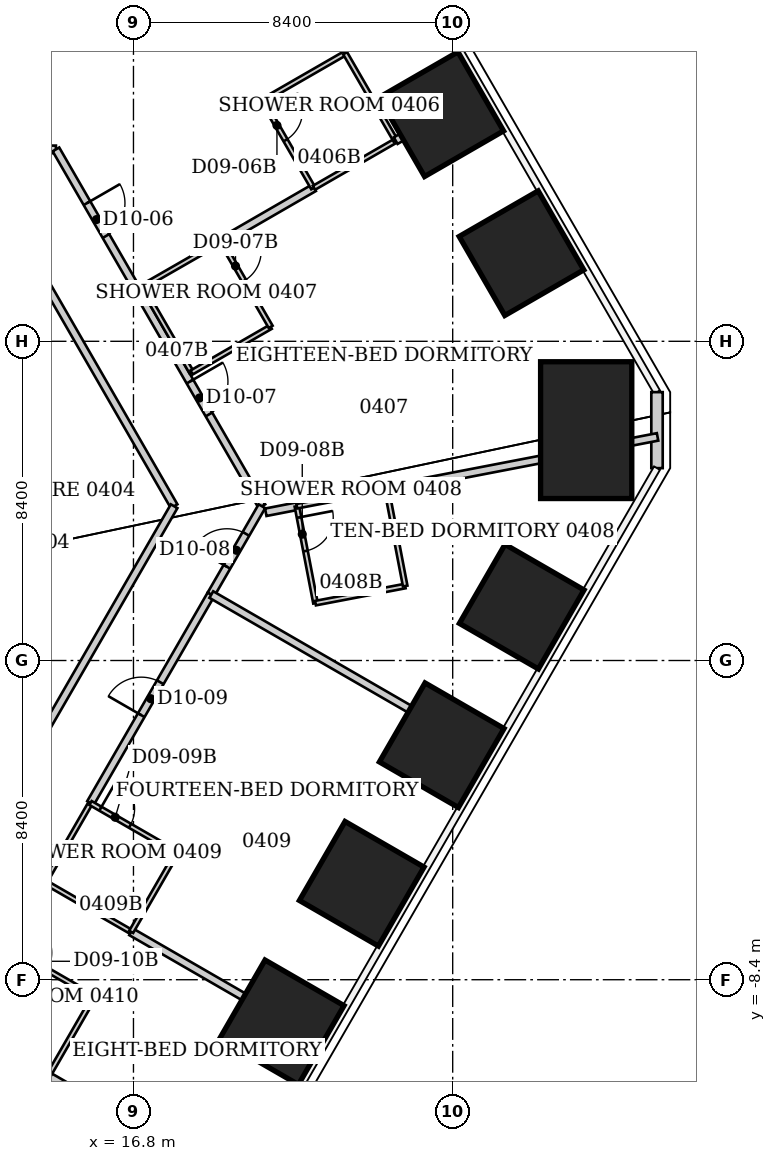
"""IFC4 building model, lengths in metres.
Left out: names, types, materials, properties, quantities, classifications, styles, units other than length and angle.
Written with IfcOpenShell. Run it as: python <this file> out.ifc"""

import sys

from ifc_helpers import new_model, si_unit, direction, frame, frame_2d, origin, origin_2d, place, context, subcontext, project, spatial, rectangle, extrude, element, fill, save


model = new_model("IFC4")
c1 = context("Model", 3, precision=1e-05, world=origin(), true_north=direction((0.0, 1.0)))
c2 = subcontext(c1, "Body", "Model", "MODEL_VIEW")
j1 = project(units=[si_unit("LENGTHUNIT", "METRE"), si_unit("PLANEANGLEUNIT", "RADIAN")], contexts=[c1])
p1 = place(None, origin())
s1 = spatial("IfcSite", under=j1, at=p1, CompositionType="ELEMENT")
p2 = place(p1, origin())
s2 = spatial("IfcBuilding", under=s1, at=p2, CompositionType="ELEMENT")
p3 = place(p2, frame((0.0, 0.0, 23.0)))
s3 = spatial("IfcBuildingStorey", under=s2, at=p3, CompositionType="ELEMENT", Elevation=23.0)
for number, where, z_axis, x_axis in (
    (1, (24.899, 14.375, 0.0), (0.0, 0.0, 1.0), (0.866, 0.5, 0.0)),
    (2, (27.01, 10.719, 0.0), (0.0, 0.0, 1.0), (0.866, 0.5, 0.0)),
):
    element("IfcColumn", number, at=place(p3, frame(where, z_axis=z_axis, x_axis=x_axis)), inside=s3, PredefinedType="COLUMN", context=c2, shape_type="SweptSolid", body=[
        extrude(rectangle(XDim=2.4, YDim=2.4, at=origin_2d()), origin(), (0.0, 0.0, 1.0), 3.8),
    ])
p4 = place(p3, frame((28.713, 6.062, 0.0), z_axis=(0.0, 0.0, 1.0), x_axis=(1.0, 0.0, 0.0)))
e3 = element("IfcColumn", 3, at=p4, inside=s3, PredefinedType="COLUMN", context=c2, shape_type="SweptSolid", body=[
    extrude(rectangle(XDim=2.4, YDim=3.6, at=origin_2d()), origin(), (0.0, 0.0, 1.0), 3.8),
])
for number, where, z_axis, x_axis in (
    (4, (27.016, 1.416, 0.0), (0.0, 0.0, 1.0), (0.866, -0.5, 0.0)),
    (5, (24.911, -2.23, 0.0), (0.0, 0.0, 1.0), (0.866, -0.5, 0.0)),
    (6, (22.806, -5.875, 0.0), (0.0, 0.0, 1.0), (0.866, -0.5, 0.0)),
    (7, (20.701, -9.521, 0.0), (0.0, 0.0, 1.0), (0.866, -0.5, 0.0)),
):
    element("IfcColumn", number, at=place(p3, frame(where, z_axis=z_axis, x_axis=x_axis)), inside=s3, PredefinedType="COLUMN", context=c2, shape_type="SweptSolid", body=[
        extrude(rectangle(XDim=2.4, YDim=2.4, at=origin_2d()), origin(), (0.0, 0.0, 1.0), 3.8),
    ])
p5 = place(p3, frame((30.576, 7.062, 0.0), z_axis=(0.0, 0.0, 1.0), x_axis=(0.0, -1.0, 0.0)))
e8 = element("IfcWall", 8, at=p5, inside=s3, PredefinedType="SOLIDWALL", context=c2, shape_type="SweptSolid", body=[
    extrude(rectangle(XDim=2.0, YDim=0.3, at=frame_2d((1.0, 0.0))), origin(), (0.0, 0.0, 1.0), 3.64),
])
p6 = place(p3, frame((13.61, 11.45, 0.0), z_axis=(0.0, 0.0, 1.0), x_axis=(0.499402776741, -0.866369936334, 0.0)))
e9 = element("IfcWall", 9, at=p6, inside=s3, PredefinedType="PARTITIONING", context=c2, shape_type="SweptSolid", body=[
    extrude(rectangle(XDim=8.53, YDim=0.2, at=frame_2d((4.265, 0.0))), origin(), (0.0, 0.0, 1.0), 3.64),
])
p7 = place(p3, frame((14.47, -5.83, 0.0), z_axis=(0.0, 0.0, 1.0), x_axis=(0.499693115345, 0.866202511239, 0.0)))
e10 = element("IfcWall", 10, at=p7, inside=s3, PredefinedType="PARTITIONING", context=c2, shape_type="SweptSolid", body=[
    extrude(rectangle(XDim=2.401, YDim=0.12, at=frame_2d((1.201, 0.0))), origin(), (0.0, 0.0, 1.0), 3.64),
])
p8 = place(p3, frame((14.47, -5.83, 0.0), z_axis=(0.0, 0.0, 1.0), x_axis=(0.866010296064, -0.500026166427, 0.0)))
e11 = element("IfcWall", 11, at=p8, inside=s3, PredefinedType="PARTITIONING", context=c2, shape_type="SweptSolid", body=[
    extrude(rectangle(XDim=2.621, YDim=0.12, at=frame_2d((1.311, 0.0))), origin(), (0.0, 0.0, 1.0), 3.023),
])
p9 = place(p3, frame((14.56, -10.931, 0.0), z_axis=(0.0, 0.0, 1.0), x_axis=(0.865995646508, -0.500051537573, 0.0)))
e12 = element("IfcWall", 12, at=p9, inside=s3, PredefinedType="PARTITIONING", context=c2, shape_type="SweptSolid", body=[
    extrude(rectangle(XDim=5.758, YDim=0.2, at=frame_2d((2.879, 0.0))), origin(), (0.0, 0.0, 1.0), 3.038),
])
p10 = place(p3, frame((14.56, -10.93, 0.0), z_axis=(0.0, 0.0, 1.0), x_axis=(0.499737123639, 0.866177122335, 0.0)))
e13 = element("IfcWall", 13, at=p10, inside=s3, PredefinedType="PARTITIONING", context=c2, shape_type="SweptSolid", body=[
    extrude(rectangle(XDim=2.401, YDim=0.12, at=frame_2d((1.201, 0.0))), origin(), (0.0, 0.0, 1.0), 3.64),
])
p11 = place(p3, frame((14.76, 13.45, 0.0), z_axis=(0.0, 0.0, 1.0), x_axis=(-1.0, 0.0, 0.0)))
e14 = element("IfcWall", 14, at=p11, inside=s3, PredefinedType="PARTITIONING", context=c2, shape_type="SweptSolid", body=[
    extrude(rectangle(XDim=3.11, YDim=0.2, at=frame_2d((1.555, 0.0))), origin(), (0.0, 0.0, 1.0), 3.64),
])
p12 = place(p3, frame((14.76, 13.45, 0.0), z_axis=(0.0, 0.0, 1.0), x_axis=(0.499894213467, -0.866086471054, 0.0)))
e15 = element("IfcWall", 15, at=p12, inside=s3, PredefinedType="PARTITIONING", context=c2, shape_type="SweptSolid", body=[
    extrude(rectangle(XDim=4.266, YDim=0.2, at=frame_2d((2.133, 0.0))), origin(), (0.0, 0.0, 1.0), 3.64),
])
p13 = place(p12, frame((1.633, 0.0, 0.0)))
e16 = element("IfcOpeningElement", 16, at=p13, cuts=e15, PredefinedType="OPENING", context=c2, shape_type="SweptSolid", body=[
    extrude(rectangle(XDim=1.0, YDim=2.13, at=frame_2d((0.5, 1.065))), frame((0.0, 0.1, 0.0), z_axis=(0.0, -1.0, 0.0), x_axis=(1.0, 0.0, 0.0)), (0.0, 0.0, 1.0), 0.2),
])
p14 = place(p3, frame((15.67, -3.75, 0.0), z_axis=(0.0, 0.0, 1.0), x_axis=(0.500061360627, 0.865989974311, 0.0)))
e17 = element("IfcWall", 17, at=p14, inside=s3, PredefinedType="PARTITIONING", context=c2, shape_type="SweptSolid", body=[
    extrude(rectangle(XDim=6.34, YDim=0.2, at=frame_2d((3.17, 0.0))), origin(), (0.0, 0.0, 1.0), 3.64),
])
p15 = place(p14, frame((2.67, 0.0, 0.0)))
e18 = element("IfcOpeningElement", 18, at=p15, cuts=e17, PredefinedType="OPENING", context=c2, shape_type="SweptSolid", body=[
    extrude(rectangle(XDim=1.0, YDim=2.13, at=frame_2d((0.5, 1.065))), frame((0.0, 0.1, 0.0), z_axis=(0.0, -1.0, 0.0), x_axis=(1.0, 0.0, 0.0)), (0.0, 0.0, 1.0), 0.2),
])
p16 = place(p3, frame((15.76, -8.85, 0.0), z_axis=(0.0, 0.0, 1.0), x_axis=(-0.866114241029, 0.499846097802, 0.0)))
e19 = element("IfcWall", 19, at=p16, inside=s3, PredefinedType="PARTITIONING", context=c2, shape_type="SweptSolid", body=[
    extrude(rectangle(XDim=2.621, YDim=0.12, at=frame_2d((1.311, 0.0))), origin(), (0.0, 0.0, 1.0), 3.64),
])
p17 = place(p16, frame((1.421, 0.0, 0.0)))
e20 = element("IfcOpeningElement", 20, at=p17, cuts=e19, PredefinedType="OPENING", context=c2, shape_type="SweptSolid", body=[
    extrude(rectangle(XDim=0.9, YDim=2.03, at=frame_2d((0.45, 1.015))), frame((0.0, 0.06, 0.0), z_axis=(0.0, -1.0, 0.0), x_axis=(1.0, 0.0, 0.0)), (0.0, 0.0, 1.0), 0.12),
])
p18 = place(p3, frame((16.74, -7.141, 0.0), z_axis=(0.0, 0.0, 1.0), x_axis=(0.865985044037, -0.500069898618, 0.0)))
e21 = element("IfcWall", 21, at=p18, inside=s3, PredefinedType="PARTITIONING", context=c2, shape_type="SweptSolid", body=[
    extrude(rectangle(XDim=5.758, YDim=0.2, at=frame_2d((2.879, 0.0))), origin(), (0.0, 0.0, 1.0), 3.023),
])
p19 = place(p3, frame((16.74, -7.14, 0.0), z_axis=(0.0, 0.0, 1.0), x_axis=(0.499737123639, 0.866177122335, 0.0)))
e22 = element("IfcWall", 22, at=p19, inside=s3, PredefinedType="PARTITIONING", context=c2, shape_type="SweptSolid", body=[
    extrude(rectangle(XDim=2.401, YDim=0.12, at=frame_2d((1.201, 0.0))), origin(), (0.0, 0.0, 1.0), 3.64),
])
p20 = place(p3, frame((16.892, 9.756, 0.0), z_axis=(0.0, 0.0, 1.0), x_axis=(0.499916344562, -0.866073696887, 0.0)))
e23 = element("IfcWall", 23, at=p20, inside=s3, PredefinedType="PARTITIONING", context=c2, shape_type="SweptSolid", body=[
    extrude(rectangle(XDim=6.576, YDim=0.2, at=frame_2d((3.288, 0.0))), origin(), (0.0, 0.0, 1.0), 3.64),
])
p21 = place(p20, frame((2.788, 0.0, 0.0)))
e24 = element("IfcOpeningElement", 24, at=p21, cuts=e23, PredefinedType="OPENING", context=c2, shape_type="SweptSolid", body=[
    extrude(rectangle(XDim=1.0, YDim=2.13, at=frame_2d((0.5, 1.065))), frame((0.0, 0.1, 0.0), z_axis=(0.0, -1.0, 0.0), x_axis=(1.0, 0.0, 0.0)), (0.0, 0.0, 1.0), 0.2),
])
p22 = place(p3, frame((16.904, 9.762, 0.0), z_axis=(0.0, 0.0, 1.0), x_axis=(0.875926787791, 0.482444051088, 0.0)))
e25 = element("IfcWall", 25, at=p22, inside=s3, PredefinedType="PARTITIONING", context=c2, shape_type="SweptSolid", body=[
    extrude(rectangle(XDim=0.143, YDim=0.2, at=frame_2d((0.071, 0.0))), origin(), (0.0, 0.0, 1.0), 3.64),
])
p23 = place(p3, frame((17.028, 9.834, 0.0), z_axis=(0.0, 0.0, 1.0), x_axis=(0.867064427496, 0.498196024242, 0.0)))
e26 = element("IfcWall", 26, at=p23, inside=s3, PredefinedType="PARTITIONING", context=c2, shape_type="SweptSolid", body=[
    extrude(rectangle(XDim=2.401, YDim=0.12, at=frame_2d((1.201, 0.0))), origin(), (0.0, 0.0, 1.0), 2.86),
])
p24 = place(p3, frame((17.03, 9.83, 0.0), z_axis=(0.0, 0.0, 1.0), x_axis=(0.500291685314, -0.865856933682, 0.0)))
e27 = element("IfcWall", 27, at=p24, inside=s3, PredefinedType="PARTITIONING", context=c2, shape_type="SweptSolid", body=[
    extrude(rectangle(XDim=2.599, YDim=0.12, at=frame_2d((1.299, 0.0))), origin(), (0.0, 0.0, 1.0), 3.64),
])
p25 = place(p3, frame((17.87, 4.06, 0.0), z_axis=(0.0, 0.0, 1.0), x_axis=(-0.499769659837, -0.866158349903, 0.0)))
e28 = element("IfcWall", 28, at=p25, inside=s3, PredefinedType="PARTITIONING", context=c2, shape_type="SweptSolid", body=[
    extrude(rectangle(XDim=13.431, YDim=0.2, at=frame_2d((6.716, 0.0))), origin(), (0.0, 0.0, 1.0), 3.64),
])
p26 = place(p3, frame((17.94, -5.06, 0.0), z_axis=(0.0, 0.0, 1.0), x_axis=(-0.866114241029, 0.499846097802, 0.0)))
e29 = element("IfcWall", 29, at=p26, inside=s3, PredefinedType="PARTITIONING", context=c2, shape_type="SweptSolid", body=[
    extrude(rectangle(XDim=2.621, YDim=0.12, at=frame_2d((1.311, 0.0))), origin(), (0.0, 0.0, 1.0), 3.64),
])
p27 = place(p26, frame((1.421, 0.0, 0.0)))
e30 = element("IfcOpeningElement", 30, at=p27, cuts=e29, PredefinedType="OPENING", context=c2, shape_type="SweptSolid", body=[
    extrude(rectangle(XDim=0.9, YDim=2.03, at=frame_2d((0.45, 1.015))), frame((0.0, 0.06, 0.0), z_axis=(0.0, -1.0, 0.0), x_axis=(1.0, 0.0, 0.0)), (0.0, 0.0, 1.0), 0.12),
])
p28 = place(p3, frame((18.33, 7.58, 0.0), z_axis=(0.0, 0.0, 1.0), x_axis=(0.866177122335, 0.499737123639, 0.0)))
e31 = element("IfcWall", 31, at=p28, inside=s3, PredefinedType="PARTITIONING", context=c2, shape_type="SweptSolid", body=[
    extrude(rectangle(XDim=2.401, YDim=0.12, at=frame_2d((1.201, 0.0))), origin(), (0.0, 0.0, 1.0), 3.64),
])
p29 = place(p3, frame((18.84, 1.74, 0.0), z_axis=(0.0, 0.0, 1.0), x_axis=(0.500098439427, 0.865968562295, 0.0)))
e32 = element("IfcWall", 32, at=p29, inside=s3, PredefinedType="PARTITIONING", context=c2, shape_type="SweptSolid", body=[
    extrude(rectangle(XDim=2.679, YDim=0.2, at=frame_2d((1.34, 0.0))), origin(), (0.0, 0.0, 1.0), 3.64),
])
p30 = place(p29, frame((0.84, 0.0, 0.0)))
e33 = element("IfcOpeningElement", 33, at=p30, cuts=e32, PredefinedType="OPENING", context=c2, shape_type="SweptSolid", body=[
    extrude(rectangle(XDim=1.0, YDim=2.13, at=frame_2d((0.5, 1.065))), frame((0.0, 0.1, 0.0), z_axis=(0.0, -1.0, 0.0), x_axis=(1.0, 0.0, 0.0)), (0.0, 0.0, 1.0), 0.2),
])
p31 = place(p3, frame((19.11, 11.03, 0.0), z_axis=(0.0, 0.0, 1.0), x_axis=(0.865839219242, 0.500322342518, 0.0)))
e34 = element("IfcWall", 34, at=p31, inside=s3, PredefinedType="PARTITIONING", context=c2, shape_type="SweptSolid", body=[
    extrude(rectangle(XDim=2.818, YDim=0.2, at=frame_2d((1.409, 0.0))), origin(), (0.0, 0.0, 1.0), 2.86),
])
p32 = place(p3, frame((20.2, 14.73, 0.0), z_axis=(0.0, 0.0, 1.0), x_axis=(0.500605174168, -0.865675724273, 0.0)))
e35 = element("IfcWall", 35, at=p32, inside=s3, PredefinedType="PARTITIONING", context=c2, shape_type="SweptSolid", body=[
    extrude(rectangle(XDim=2.657, YDim=0.12, at=frame_2d((1.329, 0.0))), origin(), (0.0, 0.0, 1.0), 3.64),
])
p33 = place(p32, frame((0.3, 0.0, 0.0)))
e36 = element("IfcOpeningElement", 36, at=p33, cuts=e35, PredefinedType="OPENING", context=c2, shape_type="SweptSolid", body=[
    extrude(rectangle(XDim=0.9, YDim=2.03, at=frame_2d((0.45, 1.015))), frame((0.0, 0.06, 0.0), z_axis=(0.0, -1.0, 0.0), x_axis=(1.0, 0.0, 0.0)), (0.0, 0.0, 1.0), 0.12),
])
p34 = place(p3, frame((20.281, 3.901, 0.0), z_axis=(0.0, 0.0, 1.0), x_axis=(0.981624527768, 0.190822657157, 0.0)))
e37 = element("IfcWall", 37, at=p34, inside=s3, PredefinedType="PARTITIONING", context=c2, shape_type="SweptSolid", body=[
    extrude(rectangle(XDim=0.834, YDim=0.2, at=frame_2d((0.417, 0.0))), origin(), (0.0, 0.0, 1.0), 3.64),
])
p35 = place(p3, frame((20.4, 23.547, 0.0), z_axis=(0.0, 0.0, 1.0), x_axis=(-0.654899675326, -0.7557158297, 0.0)))
e38 = element("IfcWall", 38, at=p35, inside=s3, PredefinedType="PARTITIONING", context=c2, shape_type="SweptSolid", body=[
    extrude(rectangle(XDim=13.251, YDim=0.2, at=frame_2d((6.625, 0.0))), origin(), (0.0, 0.0, 1.0), 3.64),
])
p36 = place(p3, frame((20.41, 8.78, 0.0), z_axis=(0.0, 0.0, 1.0), x_axis=(-0.500291685314, 0.865856933682, 0.0)))
e39 = element("IfcWall", 39, at=p36, inside=s3, PredefinedType="PARTITIONING", context=c2, shape_type="SweptSolid", body=[
    extrude(rectangle(XDim=2.599, YDim=0.12, at=frame_2d((1.299, 0.0))), origin(), (0.0, 0.0, 1.0), 3.64),
])
p37 = place(p36, frame((1.399, 0.0, 0.0)))
e40 = element("IfcOpeningElement", 40, at=p37, cuts=e39, PredefinedType="OPENING", context=c2, shape_type="SweptSolid", body=[
    extrude(rectangle(XDim=0.9, YDim=2.03, at=frame_2d((0.45, 1.015))), frame((0.0, 0.06, 0.0), z_axis=(0.0, -1.0, 0.0), x_axis=(1.0, 0.0, 0.0)), (0.0, 0.0, 1.0), 0.12),
])
p38 = place(p3, frame((21.1, 4.06, 0.0), z_axis=(0.0, 0.0, 1.0), x_axis=(0.188697442844, -0.982035271802, 0.0)))
e41 = element("IfcWall", 41, at=p38, inside=s3, PredefinedType="PARTITIONING", context=c2, shape_type="SweptSolid", body=[
    extrude(rectangle(XDim=2.597, YDim=0.12, at=frame_2d((1.298, 0.0))), origin(), (0.0, 0.0, 1.0), 3.64),
])
p39 = place(p38, frame((0.3, 0.0, 0.0)))
e42 = element("IfcOpeningElement", 42, at=p39, cuts=e41, PredefinedType="OPENING", context=c2, shape_type="SweptSolid", body=[
    extrude(rectangle(XDim=0.9, YDim=2.03, at=frame_2d((0.45, 1.015))), frame((0.0, 0.06, 0.0), z_axis=(0.0, -1.0, 0.0), x_axis=(1.0, 0.0, 0.0)), (0.0, 0.0, 1.0), 0.12),
])
p40 = place(p3, frame((21.1, 4.06, 0.0), z_axis=(0.0, 0.0, 1.0), x_axis=(0.982307423658, 0.187275533444, 0.0)))
e43 = element("IfcWall", 43, at=p40, inside=s3, PredefinedType="PARTITIONING", context=c2, shape_type="SweptSolid", body=[
    extrude(rectangle(XDim=2.403, YDim=0.12, at=frame_2d((1.201, 0.0))), origin(), (0.0, 0.0, 1.0), 3.64),
])
p41 = place(p3, frame((21.55, 12.44, 0.0), z_axis=(0.0, 0.0, 1.0), x_axis=(0.866244536399, 0.499620258956, 0.0)))
e44 = element("IfcWall", 44, at=p41, inside=s3, PredefinedType="PARTITIONING", context=c2, shape_type="SweptSolid", body=[
    extrude(rectangle(XDim=2.482, YDim=0.12, at=frame_2d((1.241, 0.0))), origin(), (0.0, 0.0, 1.0), 2.86),
])
p42 = place(p3, frame((21.59, 1.51, 0.0), z_axis=(0.0, 0.0, 1.0), x_axis=(0.982303859288, 0.187294228499, 0.0)))
e45 = element("IfcWall", 45, at=p42, inside=s3, PredefinedType="PARTITIONING", context=c2, shape_type="SweptSolid", body=[
    extrude(rectangle(XDim=2.402, YDim=0.12, at=frame_2d((1.201, 0.0))), origin(), (0.0, 0.0, 1.0), 3.64),
])
p43 = place(p3, frame((22.37, 15.98, 0.0), z_axis=(0.0, 0.0, 1.0), x_axis=(-0.86653430447, -0.499117520406, 0.0)))
e46 = element("IfcWall", 46, at=p43, inside=s3, PredefinedType="PARTITIONING", context=c2, shape_type="SweptSolid", body=[
    extrude(rectangle(XDim=2.504, YDim=0.12, at=frame_2d((1.252, 0.0))), origin(), (0.0, 0.0, 1.0), 3.64),
])
p44 = place(p3, frame((23.46, 4.51, 0.0), z_axis=(0.0, 0.0, 1.0), x_axis=(0.981929870864, 0.189245155035, 0.0)))
e47 = element("IfcWall", 47, at=p44, inside=s3, PredefinedType="PARTITIONING", context=c2, shape_type="SweptSolid", body=[
    extrude(rectangle(XDim=7.262, YDim=0.2, at=frame_2d((3.631, 0.0))), origin(), (0.0, 0.0, 1.0), 3.64),
])
p45 = place(p3, frame((23.7, 13.68, 0.0), z_axis=(0.0, 0.0, 1.0), x_axis=(-0.500605174168, 0.865675724273, 0.0)))
e48 = element("IfcWall", 48, at=p45, inside=s3, PredefinedType="PARTITIONING", context=c2, shape_type="SweptSolid", body=[
    extrude(rectangle(XDim=2.657, YDim=0.12, at=frame_2d((1.329, 0.0))), origin(), (0.0, 0.0, 1.0), 3.64),
])
p46 = place(p3, frame((23.7, 13.68, 0.0), z_axis=(0.0, 0.0, 1.0), x_axis=(0.864733482606, 0.502231026581, 0.0)))
e49 = element("IfcWall", 49, at=p46, inside=s3, PredefinedType="PARTITIONING", context=c2, shape_type="SweptSolid", body=[
    extrude(rectangle(XDim=2.528, YDim=0.2, at=frame_2d((1.264, 0.0))), origin(), (0.0, 0.0, 1.0), 3.64),
])
p47 = place(p3, frame((23.95, 1.96, 0.0), z_axis=(0.0, 0.0, 1.0), x_axis=(-0.188697442844, 0.982035271802, 0.0)))
e50 = element("IfcWall", 50, at=p47, inside=s3, PredefinedType="PARTITIONING", context=c2, shape_type="SweptSolid", body=[
    extrude(rectangle(XDim=2.597, YDim=0.12, at=frame_2d((1.298, 0.0))), origin(), (0.0, 0.0, 1.0), 3.64),
])
p48 = place(p3, frame((26.096, -2.45, 0.0), z_axis=(0.0, 0.0, 1.0), x_axis=(-0.866002919298, 0.500038942252, 0.0)))
e51 = element("IfcWall", 51, at=p48, inside=s3, PredefinedType="PARTITIONING", context=c2, shape_type="SweptSolid", body=[
    extrude(rectangle(XDim=8.369, YDim=0.2, at=frame_2d((4.185, 0.0))), origin(), (0.0, 0.0, 1.0), 3.64),
])
p49 = place(p13, origin())
e52 = element("IfcDoor", 52, at=p49, inside=s3, OperationType="SINGLE_SWING_LEFT", PredefinedType="DOOR", context=c2, shape_type="SweptSolid", body=[
    extrude(rectangle(XDim=1.0, YDim=2.13, at=frame_2d((0.5, 1.065))), frame((0.0, 0.025, 0.0), z_axis=(0.0, -1.0, 0.0), x_axis=(1.0, 0.0, 0.0)), (0.0, 0.0, 1.0), 0.05),
])
fill(e16, e52)
p50 = place(p33, origin())
e53 = element("IfcDoor", 53, at=p50, inside=s3, OperationType="SINGLE_SWING_LEFT", PredefinedType="DOOR", context=c2, shape_type="SweptSolid", body=[
    extrude(rectangle(XDim=0.9, YDim=2.03, at=frame_2d((0.45, 1.015))), frame((0.0, 0.025, 0.0), z_axis=(0.0, -1.0, 0.0), x_axis=(1.0, 0.0, 0.0)), (0.0, 0.0, 1.0), 0.05),
])
fill(e36, e53)
p51 = place(p21, origin())
e54 = element("IfcDoor", 54, at=p51, inside=s3, OperationType="SINGLE_SWING_LEFT", PredefinedType="DOOR", context=c2, shape_type="SweptSolid", body=[
    extrude(rectangle(XDim=1.0, YDim=2.13, at=frame_2d((0.5, 1.065))), frame((0.0, 0.025, 0.0), z_axis=(0.0, -1.0, 0.0), x_axis=(1.0, 0.0, 0.0)), (0.0, 0.0, 1.0), 0.05),
])
fill(e24, e54)
p52 = place(p37, origin())
e55 = element("IfcDoor", 55, at=p52, inside=s3, OperationType="SINGLE_SWING_RIGHT", PredefinedType="DOOR", context=c2, shape_type="SweptSolid", body=[
    extrude(rectangle(XDim=0.9, YDim=2.03, at=frame_2d((0.45, 1.015))), frame((0.0, 0.025, 0.0), z_axis=(0.0, -1.0, 0.0), x_axis=(1.0, 0.0, 0.0)), (0.0, 0.0, 1.0), 0.05),
])
fill(e40, e55)
p53 = place(p30, origin())
e56 = element("IfcDoor", 56, at=p53, inside=s3, OperationType="SINGLE_SWING_LEFT", PredefinedType="DOOR", context=c2, shape_type="SweptSolid", body=[
    extrude(rectangle(XDim=1.0, YDim=2.13, at=frame_2d((0.5, 1.065))), frame((0.0, 0.025, 0.0), z_axis=(0.0, -1.0, 0.0), x_axis=(1.0, 0.0, 0.0)), (0.0, 0.0, 1.0), 0.05),
])
fill(e33, e56)
p54 = place(p39, origin())
e57 = element("IfcDoor", 57, at=p54, inside=s3, OperationType="SINGLE_SWING_LEFT", PredefinedType="DOOR", context=c2, shape_type="SweptSolid", body=[
    extrude(rectangle(XDim=0.9, YDim=2.03, at=frame_2d((0.45, 1.015))), frame((0.0, 0.025, 0.0), z_axis=(0.0, -1.0, 0.0), x_axis=(1.0, 0.0, 0.0)), (0.0, 0.0, 1.0), 0.05),
])
fill(e42, e57)
p55 = place(p15, origin())
e58 = element("IfcDoor", 58, at=p55, inside=s3, OperationType="SINGLE_SWING_LEFT", PredefinedType="DOOR", context=c2, shape_type="SweptSolid", body=[
    extrude(rectangle(XDim=1.0, YDim=2.13, at=frame_2d((0.5, 1.065))), frame((0.0, 0.025, 0.0), z_axis=(0.0, -1.0, 0.0), x_axis=(1.0, 0.0, 0.0)), (0.0, 0.0, 1.0), 0.05),
])
fill(e18, e58)
p56 = place(p27, origin())
e59 = element("IfcDoor", 59, at=p56, inside=s3, OperationType="SINGLE_SWING_RIGHT", PredefinedType="DOOR", context=c2, shape_type="SweptSolid", body=[
    extrude(rectangle(XDim=0.9, YDim=2.03, at=frame_2d((0.45, 1.015))), frame((0.0, 0.025, 0.0), z_axis=(0.0, -1.0, 0.0), x_axis=(1.0, 0.0, 0.0)), (0.0, 0.0, 1.0), 0.05),
])
fill(e30, e59)
save(model, sys.argv[1])
